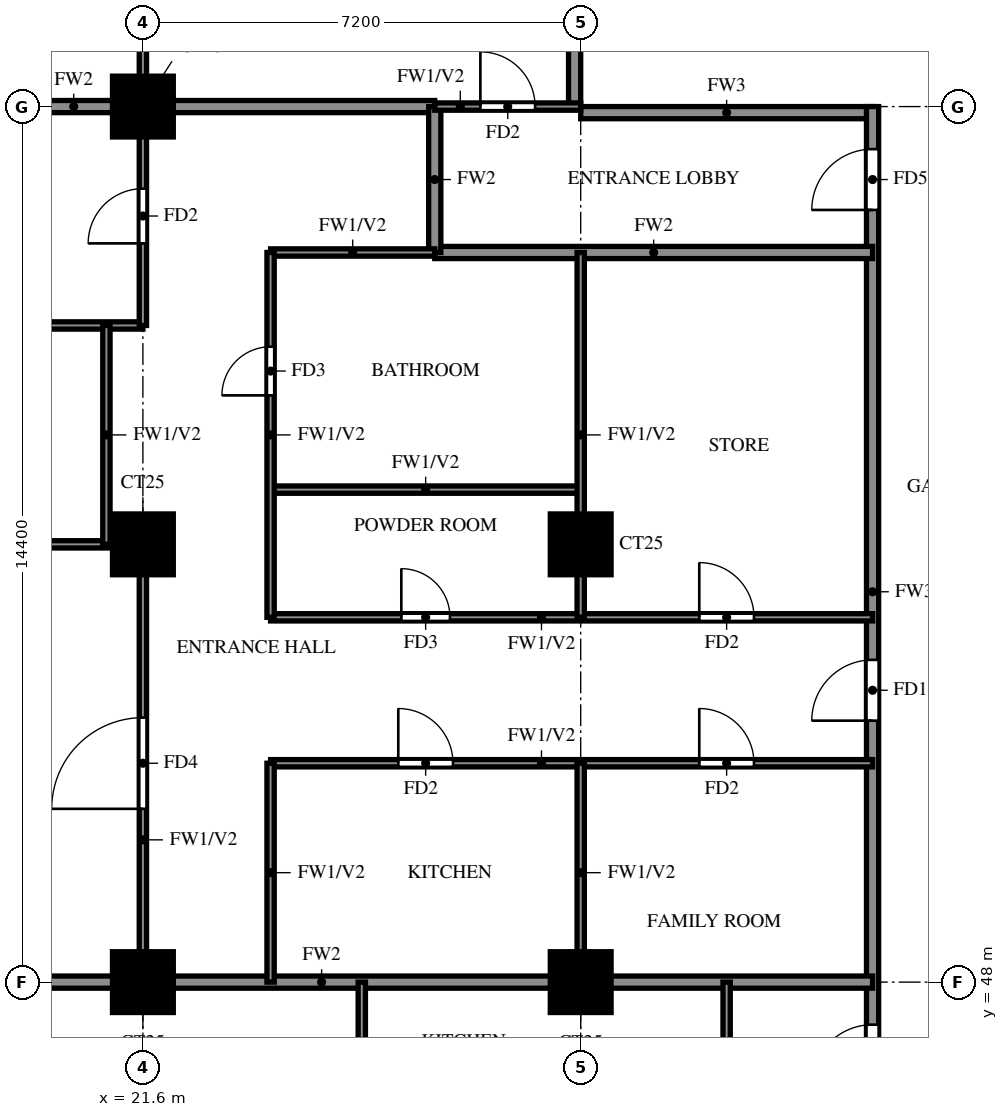
"""IFC4 building model, lengths in metres.
Left out: names, types, materials, properties, quantities, classifications, styles, units other than length and angle.
Written with IfcOpenShell. Run it as: python <this file> out.ifc"""

import sys

from ifc_helpers import new_model, si_unit, direction, frame, frame_2d, origin, origin_2d, place, context, subcontext, project, spatial, rectangle, extrude, source, transform, mapped, element, fill, save


model = new_model("IFC4")
c1 = context("Model", 3, precision=1e-05, world=origin(), true_north=direction((0.0, 1.0)))
c2 = subcontext(c1, "Body", "Model", "MODEL_VIEW")
j1 = project(units=[si_unit("LENGTHUNIT", "METRE"), si_unit("PLANEANGLEUNIT", "RADIAN")], contexts=[c1])
p1 = place(None, origin())
s1 = spatial("IfcSite", under=j1, at=p1, CompositionType="ELEMENT")
p2 = place(p1, origin())
s2 = spatial("IfcBuilding", under=s1, at=p2, CompositionType="ELEMENT")
p3 = place(p2, frame((0.0, 0.0, 143.0)))
s3 = spatial("IfcBuildingStorey", under=s2, at=p3, CompositionType="ELEMENT", Elevation=143.0)
m1 = source(origin(), c2, "Body", "SweptSolid", [
    extrude(rectangle(XDim=1.0, YDim=1.0, at=origin_2d()), origin(), (0.0, 0.0, 1.0), 3.2),
])
for number, where, z_axis, x_axis in (
    (1, (21.6, 48.0, 0.0), (0.0, 0.0, 1.0), (1.0, 0.0, 0.0)),
    (2, (28.8, 48.0, 0.0), (0.0, 0.0, 1.0), (1.0, 0.0, 0.0)),
    (3, (21.6, 55.2, 0.0), (0.0, 0.0, 1.0), (1.0, 0.0, 0.0)),
    (4, (28.8, 55.2, 0.0), (0.0, 0.0, 1.0), (1.0, 0.0, 0.0)),
    (5, (21.6, 62.4, 0.0), (0.0, 0.0, 1.0), (1.0, 0.0, 0.0)),
):
    element("IfcColumn", number, at=place(p3, frame(where, z_axis=z_axis, x_axis=x_axis)), inside=s3, PredefinedType="COLUMN", context=c2, shape_type="MappedRepresentation", body=[
        mapped(m1, transform((0.0, 0.0, 0.0))),
    ])
p4 = place(p3, frame((28.8, 62.3, 0.0), z_axis=(0.0, 0.0, 1.0), x_axis=(1.0, 0.0, 0.0)))
e6 = element("IfcWall", 6, at=p4, inside=s3, PredefinedType="SOLIDWALL", context=c2, shape_type="SweptSolid", body=[
    extrude(rectangle(XDim=4.8, YDim=0.2, at=frame_2d((2.4, 0.0))), origin(), (0.0, 0.0, 1.0), 3.2),
])
p5 = place(p3, frame((28.7, 62.4, 0.0), z_axis=(0.0, 0.0, 1.0), x_axis=(0.0, 1.0, 0.0)))
e7 = element("IfcWall", 7, at=p5, inside=s3, PredefinedType="SOLIDWALL", context=c2, shape_type="SweptSolid", body=[
    extrude(rectangle(XDim=15.6, YDim=0.2, at=frame_2d((7.8, 0.0))), origin(), (0.0, 0.0, 1.0), 3.2),
])
p6 = place(p3, frame((33.6, 45.6, 0.0), z_axis=(0.0, 0.0, 1.0), x_axis=(0.0, 1.0, 0.0)))
e8 = element("IfcWall", 8, at=p6, inside=s3, PredefinedType="SOLIDWALL", context=c2, shape_type="SweptSolid", body=[
    extrude(rectangle(XDim=16.8, YDim=0.2, at=frame_2d((8.4, 0.0))), origin(), (0.0, 0.0, 1.0), 3.2),
])
p7 = place(p6, frame((0.7, 0.0, 0.0)))
e9 = element("IfcOpeningElement", 9, at=p7, cuts=e8, PredefinedType="OPENING", context=c2, shape_type="SweptSolid", body=[
    extrude(rectangle(XDim=1.0, YDim=2.1, at=frame_2d((0.5, 1.05))), frame((0.0, 0.11, 0.0), z_axis=(0.0, -1.0, 0.0), x_axis=(1.0, 0.0, 0.0)), (0.0, 0.0, 1.0), 0.22),
])
p8 = place(p6, frame((6.7, 0.0, 0.0)))
e10 = element("IfcOpeningElement", 10, at=p8, cuts=e8, PredefinedType="OPENING", context=c2, shape_type="SweptSolid", body=[
    extrude(rectangle(XDim=1.0, YDim=2.1, at=frame_2d((0.5, 1.05))), frame((0.0, 0.11, 0.0), z_axis=(0.0, -1.0, 0.0), x_axis=(1.0, 0.0, 0.0)), (0.0, 0.0, 1.0), 0.22),
])
p9 = place(p6, frame((15.1, 0.0, 0.0)))
e11 = element("IfcOpeningElement", 11, at=p9, cuts=e8, PredefinedType="OPENING", context=c2, shape_type="SweptSolid", body=[
    extrude(rectangle(XDim=1.0, YDim=2.1, at=frame_2d((0.5, 1.05))), frame((0.0, 0.11, 0.0), z_axis=(0.0, -1.0, 0.0), x_axis=(1.0, 0.0, 0.0)), (0.0, 0.0, 1.0), 0.22),
])
p10 = place(p3, frame((14.525, 48.0, 0.0), z_axis=(0.0, 0.0, 1.0), x_axis=(1.0, 0.0, 0.0)))
e12 = element("IfcWall", 12, at=p10, inside=s3, PredefinedType="SOLIDWALL", context=c2, shape_type="SweptSolid", body=[
    extrude(rectangle(XDim=19.075, YDim=0.2, at=frame_2d((9.538, 0.0))), origin(), (0.0, 0.0, 1.0), 3.2),
])
p11 = place(p3, frame((26.4, 60.0, 0.0), z_axis=(0.0, 0.0, 1.0), x_axis=(1.0, 0.0, 0.0)))
e13 = element("IfcWall", 13, at=p11, inside=s3, PredefinedType="SOLIDWALL", context=c2, shape_type="SweptSolid", body=[
    extrude(rectangle(XDim=7.2, YDim=0.2, at=frame_2d((3.6, 0.0))), origin(), (0.0, 0.0, 1.0), 3.2),
])
p12 = place(p3, frame((14.525, 62.4, 0.0), z_axis=(0.0, 0.0, 1.0), x_axis=(1.0, 0.0, 0.0)))
e14 = element("IfcWall", 14, at=p12, inside=s3, PredefinedType="SOLIDWALL", context=c2, shape_type="SweptSolid", body=[
    extrude(rectangle(XDim=11.875, YDim=0.2, at=frame_2d((5.938, 0.0))), origin(), (0.0, 0.0, 1.0), 3.2),
])
p13 = place(p3, frame((26.4, 60.0, 0.0), z_axis=(0.0, 0.0, 1.0), x_axis=(0.0, 1.0, 0.0)))
e15 = element("IfcWall", 15, at=p13, inside=s3, PredefinedType="SOLIDWALL", context=c2, shape_type="SweptSolid", body=[
    extrude(rectangle(XDim=2.4, YDim=0.2, at=frame_2d((1.2, 0.0))), origin(), (0.0, 0.0, 1.0), 3.2),
])
p14 = place(p3, frame((23.7, 51.6, 0.0), z_axis=(0.0, 0.0, 1.0), x_axis=(1.0, 0.0, 0.0)))
e16 = element("IfcWall", 16, at=p14, inside=s3, PredefinedType="PARTITIONING", context=c2, shape_type="SweptSolid", body=[
    extrude(rectangle(XDim=9.9, YDim=0.12, at=frame_2d((4.95, 0.0))), origin(), (0.0, 0.0, 1.0), 3.2),
])
p15 = place(p14, frame((2.1, 0.0, 0.0)))
e17 = element("IfcOpeningElement", 17, at=p15, cuts=e16, PredefinedType="OPENING", context=c2, shape_type="SweptSolid", body=[
    extrude(rectangle(XDim=0.9, YDim=2.1, at=frame_2d((0.45, 1.05))), frame((0.0, 0.07, 0.0), z_axis=(0.0, -1.0, 0.0), x_axis=(1.0, 0.0, 0.0)), (0.0, 0.0, 1.0), 0.14),
])
p16 = place(p14, frame((7.05, 0.0, 0.0)))
e18 = element("IfcOpeningElement", 18, at=p16, cuts=e16, PredefinedType="OPENING", context=c2, shape_type="SweptSolid", body=[
    extrude(rectangle(XDim=0.9, YDim=2.1, at=frame_2d((0.45, 1.05))), frame((0.0, 0.07, 0.0), z_axis=(0.0, -1.0, 0.0), x_axis=(1.0, 0.0, 0.0)), (0.0, 0.0, 1.0), 0.14),
])
p17 = place(p3, frame((23.7, 54.0, 0.0), z_axis=(0.0, 0.0, 1.0), x_axis=(1.0, 0.0, 0.0)))
e19 = element("IfcWall", 19, at=p17, inside=s3, PredefinedType="PARTITIONING", context=c2, shape_type="SweptSolid", body=[
    extrude(rectangle(XDim=9.9, YDim=0.12, at=frame_2d((4.95, 0.0))), origin(), (0.0, 0.0, 1.0), 3.2),
])
p18 = place(p17, frame((2.15, 0.0, 0.0)))
e20 = element("IfcOpeningElement", 20, at=p18, cuts=e19, PredefinedType="OPENING", context=c2, shape_type="SweptSolid", body=[
    extrude(rectangle(XDim=0.8, YDim=2.1, at=frame_2d((0.4, 1.05))), frame((0.0, 0.07, 0.0), z_axis=(0.0, -1.0, 0.0), x_axis=(1.0, 0.0, 0.0)), (0.0, 0.0, 1.0), 0.14),
])
p19 = place(p17, frame((7.05, 0.0, 0.0)))
e21 = element("IfcOpeningElement", 21, at=p19, cuts=e19, PredefinedType="OPENING", context=c2, shape_type="SweptSolid", body=[
    extrude(rectangle(XDim=0.9, YDim=2.1, at=frame_2d((0.45, 1.05))), frame((0.0, 0.07, 0.0), z_axis=(0.0, -1.0, 0.0), x_axis=(1.0, 0.0, 0.0)), (0.0, 0.0, 1.0), 0.14),
])
p20 = place(p3, frame((14.525, 55.2, 0.0), z_axis=(0.0, 0.0, 1.0), x_axis=(1.0, 0.0, 0.0)))
e22 = element("IfcWall", 22, at=p20, inside=s3, PredefinedType="PARTITIONING", context=c2, shape_type="SweptSolid", body=[
    extrude(rectangle(XDim=7.075, YDim=0.12, at=frame_2d((3.538, 0.0))), origin(), (0.0, 0.0, 1.0), 3.2),
])
p21 = place(p3, frame((23.7, 56.1, 0.0), z_axis=(0.0, 0.0, 1.0), x_axis=(1.0, 0.0, 0.0)))
e23 = element("IfcWall", 23, at=p21, inside=s3, PredefinedType="PARTITIONING", context=c2, shape_type="SweptSolid", body=[
    extrude(rectangle(XDim=5.1, YDim=0.12, at=frame_2d((2.55, 0.0))), origin(), (0.0, 0.0, 1.0), 3.2),
])
p22 = place(p3, frame((14.525, 58.8, 0.0), z_axis=(0.0, 0.0, 1.0), x_axis=(1.0, 0.0, 0.0)))
e24 = element("IfcWall", 24, at=p22, inside=s3, PredefinedType="PARTITIONING", context=c2, shape_type="SweptSolid", body=[
    extrude(rectangle(XDim=7.075, YDim=0.12, at=frame_2d((3.538, 0.0))), origin(), (0.0, 0.0, 1.0), 2.3),
])
p23 = place(p22, frame((2.837, 0.0, 0.0)))
e25 = element("IfcOpeningElement", 25, at=p23, cuts=e24, PredefinedType="OPENING", context=c2, shape_type="SweptSolid", body=[
    extrude(rectangle(XDim=0.8, YDim=2.1, at=frame_2d((0.4, 1.05))), frame((0.0, 0.07, 0.0), z_axis=(0.0, -1.0, 0.0), x_axis=(1.0, 0.0, 0.0)), (0.0, 0.0, 1.0), 0.14),
])
p24 = place(p3, frame((23.7, 60.0, 0.0), z_axis=(0.0, 0.0, 1.0), x_axis=(1.0, 0.0, 0.0)))
e26 = element("IfcWall", 26, at=p24, inside=s3, PredefinedType="PARTITIONING", context=c2, shape_type="SweptSolid", body=[
    extrude(rectangle(XDim=2.7, YDim=0.12, at=frame_2d((1.35, 0.0))), origin(), (0.0, 0.0, 1.0), 3.2),
])
p25 = place(p3, frame((26.4, 62.4, 0.0), z_axis=(0.0, 0.0, 1.0), x_axis=(1.0, 0.0, 0.0)))
e27 = element("IfcWall", 27, at=p25, inside=s3, PredefinedType="PARTITIONING", context=c2, shape_type="SweptSolid", body=[
    extrude(rectangle(XDim=2.4, YDim=0.12, at=frame_2d((1.2, 0.0))), origin(), (0.0, 0.0, 1.0), 3.2),
])
p26 = place(p25, frame((0.75, 0.0, 0.0)))
e28 = element("IfcOpeningElement", 28, at=p26, cuts=e27, PredefinedType="OPENING", context=c2, shape_type="SweptSolid", body=[
    extrude(rectangle(XDim=0.9, YDim=2.1, at=frame_2d((0.45, 1.05))), frame((0.0, 0.07, 0.0), z_axis=(0.0, -1.0, 0.0), x_axis=(1.0, 0.0, 0.0)), (0.0, 0.0, 1.0), 0.14),
])
p27 = place(p3, frame((21.0, 55.2, 0.0), z_axis=(0.0, 0.0, 1.0), x_axis=(0.0, 1.0, 0.0)))
e29 = element("IfcWall", 29, at=p27, inside=s3, PredefinedType="PARTITIONING", context=c2, shape_type="SweptSolid", body=[
    extrude(rectangle(XDim=3.6, YDim=0.12, at=frame_2d((1.8, 0.0))), origin(), (0.0, 0.0, 1.0), 3.2),
])
p28 = place(p3, frame((21.6, 48.0, 0.0), z_axis=(0.0, 0.0, 1.0), x_axis=(0.0, 1.0, 0.0)))
e30 = element("IfcWall", 30, at=p28, inside=s3, PredefinedType="PARTITIONING", context=c2, shape_type="SweptSolid", body=[
    extrude(rectangle(XDim=7.2, YDim=0.12, at=frame_2d((3.6, 0.0))), origin(), (0.0, 0.0, 1.0), 3.2),
])
p29 = place(p28, frame((2.85, 0.0, 0.0)))
e31 = element("IfcOpeningElement", 31, at=p29, cuts=e30, PredefinedType="OPENING", context=c2, shape_type="SweptSolid", body=[
    extrude(rectangle(XDim=1.5, YDim=2.1, at=frame_2d((0.75, 1.05))), frame((0.0, 0.07, 0.0), z_axis=(0.0, -1.0, 0.0), x_axis=(1.0, 0.0, 0.0)), (0.0, 0.0, 1.0), 0.14),
])
p30 = place(p3, frame((21.6, 58.8, 0.0), z_axis=(0.0, 0.0, 1.0), x_axis=(0.0, 1.0, 0.0)))
e32 = element("IfcWall", 32, at=p30, inside=s3, PredefinedType="PARTITIONING", context=c2, shape_type="SweptSolid", body=[
    extrude(rectangle(XDim=10.8, YDim=0.12, at=frame_2d((5.4, 0.0))), origin(), (0.0, 0.0, 1.0), 3.2),
])
p31 = place(p30, frame((1.35, 0.0, 0.0)))
e33 = element("IfcOpeningElement", 33, at=p31, cuts=e32, PredefinedType="OPENING", context=c2, shape_type="SweptSolid", body=[
    extrude(rectangle(XDim=0.9, YDim=2.1, at=frame_2d((0.45, 1.05))), frame((0.0, 0.07, 0.0), z_axis=(0.0, -1.0, 0.0), x_axis=(1.0, 0.0, 0.0)), (0.0, 0.0, 1.0), 0.14),
])
p32 = place(p30, frame((4.95, 0.0, 0.0)))
e34 = element("IfcOpeningElement", 34, at=p32, cuts=e32, PredefinedType="OPENING", context=c2, shape_type="SweptSolid", body=[
    extrude(rectangle(XDim=0.9, YDim=2.1, at=frame_2d((0.45, 1.05))), frame((0.0, 0.07, 0.0), z_axis=(0.0, -1.0, 0.0), x_axis=(1.0, 0.0, 0.0)), (0.0, 0.0, 1.0), 0.14),
])
p33 = place(p30, frame((8.55, 0.0, 0.0)))
e35 = element("IfcOpeningElement", 35, at=p33, cuts=e32, PredefinedType="OPENING", context=c2, shape_type="SweptSolid", body=[
    extrude(rectangle(XDim=0.9, YDim=2.1, at=frame_2d((0.45, 1.05))), frame((0.0, 0.07, 0.0), z_axis=(0.0, -1.0, 0.0), x_axis=(1.0, 0.0, 0.0)), (0.0, 0.0, 1.0), 0.14),
])
p34 = place(p3, frame((23.7, 48.0, 0.0), z_axis=(0.0, 0.0, 1.0), x_axis=(0.0, 1.0, 0.0)))
e36 = element("IfcWall", 36, at=p34, inside=s3, PredefinedType="PARTITIONING", context=c2, shape_type="SweptSolid", body=[
    extrude(rectangle(XDim=3.6, YDim=0.12, at=frame_2d((1.8, 0.0))), origin(), (0.0, 0.0, 1.0), 3.2),
])
p35 = place(p3, frame((23.7, 54.0, 0.0), z_axis=(0.0, 0.0, 1.0), x_axis=(0.0, 1.0, 0.0)))
e37 = element("IfcWall", 37, at=p35, inside=s3, PredefinedType="PARTITIONING", context=c2, shape_type="SweptSolid", body=[
    extrude(rectangle(XDim=6.0, YDim=0.12, at=frame_2d((3.0, 0.0))), origin(), (0.0, 0.0, 1.0), 3.2),
])
p36 = place(p35, frame((3.65, 0.0, 0.0)))
e38 = element("IfcOpeningElement", 38, at=p36, cuts=e37, PredefinedType="OPENING", context=c2, shape_type="SweptSolid", body=[
    extrude(rectangle(XDim=0.8, YDim=2.1, at=frame_2d((0.4, 1.05))), frame((0.0, 0.07, 0.0), z_axis=(0.0, -1.0, 0.0), x_axis=(1.0, 0.0, 0.0)), (0.0, 0.0, 1.0), 0.14),
])
p37 = place(p3, frame((25.2, 39.725, 0.0), z_axis=(0.0, 0.0, 1.0), x_axis=(0.0, 1.0, 0.0)))
e39 = element("IfcWall", 39, at=p37, inside=s3, PredefinedType="PARTITIONING", context=c2, shape_type="SweptSolid", body=[
    extrude(rectangle(XDim=8.275, YDim=0.12, at=frame_2d((4.137, 0.0))), origin(), (0.0, 0.0, 1.0), 3.2),
])
p38 = place(p37, frame((4.525, 0.0, 0.0)))
e40 = element("IfcOpeningElement", 40, at=p38, cuts=e39, PredefinedType="OPENING", context=c2, shape_type="SweptSolid", body=[
    extrude(rectangle(XDim=0.9, YDim=2.1, at=frame_2d((0.45, 1.05))), frame((0.0, 0.07, 0.0), z_axis=(0.0, -1.0, 0.0), x_axis=(1.0, 0.0, 0.0)), (0.0, 0.0, 1.0), 0.14),
])
p39 = place(p3, frame((28.8, 48.0, 0.0), z_axis=(0.0, 0.0, 1.0), x_axis=(0.0, 1.0, 0.0)))
e41 = element("IfcWall", 41, at=p39, inside=s3, PredefinedType="PARTITIONING", context=c2, shape_type="SweptSolid", body=[
    extrude(rectangle(XDim=3.6, YDim=0.12, at=frame_2d((1.8, 0.0))), origin(), (0.0, 0.0, 1.0), 3.2),
])
p40 = place(p3, frame((28.8, 54.0, 0.0), z_axis=(0.0, 0.0, 1.0), x_axis=(0.0, 1.0, 0.0)))
e42 = element("IfcWall", 42, at=p40, inside=s3, PredefinedType="PARTITIONING", context=c2, shape_type="SweptSolid", body=[
    extrude(rectangle(XDim=6.0, YDim=0.12, at=frame_2d((3.0, 0.0))), origin(), (0.0, 0.0, 1.0), 3.2),
])
p41 = place(p3, frame((31.2, 45.6, 0.0), z_axis=(0.0, 0.0, 1.0), x_axis=(0.0, 1.0, 0.0)))
e43 = element("IfcWall", 43, at=p41, inside=s3, PredefinedType="PARTITIONING", context=c2, shape_type="SweptSolid", body=[
    extrude(rectangle(XDim=2.4, YDim=0.12, at=frame_2d((1.2, 0.0))), origin(), (0.0, 0.0, 1.0), 3.2),
])
p42 = place(p7, origin())
e44 = element("IfcDoor", 44, at=p42, inside=s3, OperationType="SINGLE_SWING_LEFT", PredefinedType="DOOR", context=c2, shape_type="SweptSolid", body=[
    extrude(rectangle(XDim=1.0, YDim=2.1, at=frame_2d((0.5, 1.05))), frame((0.0, 0.025, 0.0), z_axis=(0.0, -1.0, 0.0), x_axis=(1.0, 0.0, 0.0)), (0.0, 0.0, 1.0), 0.05),
])
fill(e9, e44)
p43 = place(p8, origin())
e45 = element("IfcDoor", 45, at=p43, inside=s3, OperationType="SINGLE_SWING_LEFT", PredefinedType="DOOR", context=c2, shape_type="SweptSolid", body=[
    extrude(rectangle(XDim=1.0, YDim=2.1, at=frame_2d((0.5, 1.05))), frame((0.0, 0.025, 0.0), z_axis=(0.0, -1.0, 0.0), x_axis=(1.0, 0.0, 0.0)), (0.0, 0.0, 1.0), 0.05),
])
fill(e10, e45)
p44 = place(p29, origin())
e46 = element("IfcDoor", 46, at=p44, inside=s3, OperationType="SINGLE_SWING_LEFT", PredefinedType="DOOR", context=c2, shape_type="SweptSolid", body=[
    extrude(rectangle(XDim=1.5, YDim=2.1, at=frame_2d((0.75, 1.05))), frame((0.0, 0.025, 0.0), z_axis=(0.0, -1.0, 0.0), x_axis=(1.0, 0.0, 0.0)), (0.0, 0.0, 1.0), 0.05),
])
fill(e31, e46)
p45 = place(p31, origin())
e47 = element("IfcDoor", 47, at=p45, inside=s3, OperationType="SINGLE_SWING_RIGHT", PredefinedType="DOOR", context=c2, shape_type="SweptSolid", body=[
    extrude(rectangle(XDim=0.9, YDim=2.1, at=frame_2d((0.45, 1.05))), frame((0.0, 0.025, 0.0), z_axis=(0.0, -1.0, 0.0), x_axis=(1.0, 0.0, 0.0)), (0.0, 0.0, 1.0), 0.05),
])
fill(e33, e47)
p46 = place(p15, origin())
e48 = element("IfcDoor", 48, at=p46, inside=s3, OperationType="SINGLE_SWING_LEFT", PredefinedType="DOOR", context=c2, shape_type="SweptSolid", body=[
    extrude(rectangle(XDim=0.9, YDim=2.1, at=frame_2d((0.45, 1.05))), frame((0.0, 0.025, 0.0), z_axis=(0.0, -1.0, 0.0), x_axis=(1.0, 0.0, 0.0)), (0.0, 0.0, 1.0), 0.05),
])
fill(e17, e48)
p47 = place(p18, origin())
e49 = element("IfcDoor", 49, at=p47, inside=s3, OperationType="SINGLE_SWING_RIGHT", PredefinedType="DOOR", context=c2, shape_type="SweptSolid", body=[
    extrude(rectangle(XDim=0.8, YDim=2.1, at=frame_2d((0.4, 1.05))), frame((0.0, 0.025, 0.0), z_axis=(0.0, -1.0, 0.0), x_axis=(1.0, 0.0, 0.0)), (0.0, 0.0, 1.0), 0.05),
])
fill(e20, e49)
p48 = place(p36, origin())
e50 = element("IfcDoor", 50, at=p48, inside=s3, OperationType="SINGLE_SWING_LEFT", PredefinedType="DOOR", context=c2, shape_type="SweptSolid", body=[
    extrude(rectangle(XDim=0.8, YDim=2.1, at=frame_2d((0.4, 1.05))), frame((0.0, 0.025, 0.0), z_axis=(0.0, -1.0, 0.0), x_axis=(1.0, 0.0, 0.0)), (0.0, 0.0, 1.0), 0.05),
])
fill(e38, e50)
p49 = place(p16, origin())
e51 = element("IfcDoor", 51, at=p49, inside=s3, OperationType="SINGLE_SWING_LEFT", PredefinedType="DOOR", context=c2, shape_type="SweptSolid", body=[
    extrude(rectangle(XDim=0.9, YDim=2.1, at=frame_2d((0.45, 1.05))), frame((0.0, 0.025, 0.0), z_axis=(0.0, -1.0, 0.0), x_axis=(1.0, 0.0, 0.0)), (0.0, 0.0, 1.0), 0.05),
])
fill(e18, e51)
p50 = place(p19, origin())
e52 = element("IfcDoor", 52, at=p50, inside=s3, OperationType="SINGLE_SWING_RIGHT", PredefinedType="DOOR", context=c2, shape_type="SweptSolid", body=[
    extrude(rectangle(XDim=0.9, YDim=2.1, at=frame_2d((0.45, 1.05))), frame((0.0, 0.025, 0.0), z_axis=(0.0, -1.0, 0.0), x_axis=(1.0, 0.0, 0.0)), (0.0, 0.0, 1.0), 0.05),
])
fill(e21, e52)
p51 = place(p26, origin())
e53 = element("IfcDoor", 53, at=p51, inside=s3, OperationType="SINGLE_SWING_LEFT", PredefinedType="DOOR", context=c2, shape_type="SweptSolid", body=[
    extrude(rectangle(XDim=0.9, YDim=2.1, at=frame_2d((0.45, 1.05))), frame((0.0, 0.025, 0.0), z_axis=(0.0, -1.0, 0.0), x_axis=(1.0, 0.0, 0.0)), (0.0, 0.0, 1.0), 0.05),
])
fill(e28, e53)
p52 = place(p9, origin())
e54 = element("IfcDoor", 54, at=p52, inside=s3, OperationType="SINGLE_SWING_LEFT", PredefinedType="DOOR", context=c2, shape_type="SweptSolid", body=[
    extrude(rectangle(XDim=1.0, YDim=2.1, at=frame_2d((0.5, 1.05))), frame((0.0, 0.025, 0.0), z_axis=(0.0, -1.0, 0.0), x_axis=(1.0, 0.0, 0.0)), (0.0, 0.0, 1.0), 0.05),
])
fill(e11, e54)
save(model, sys.argv[1])
